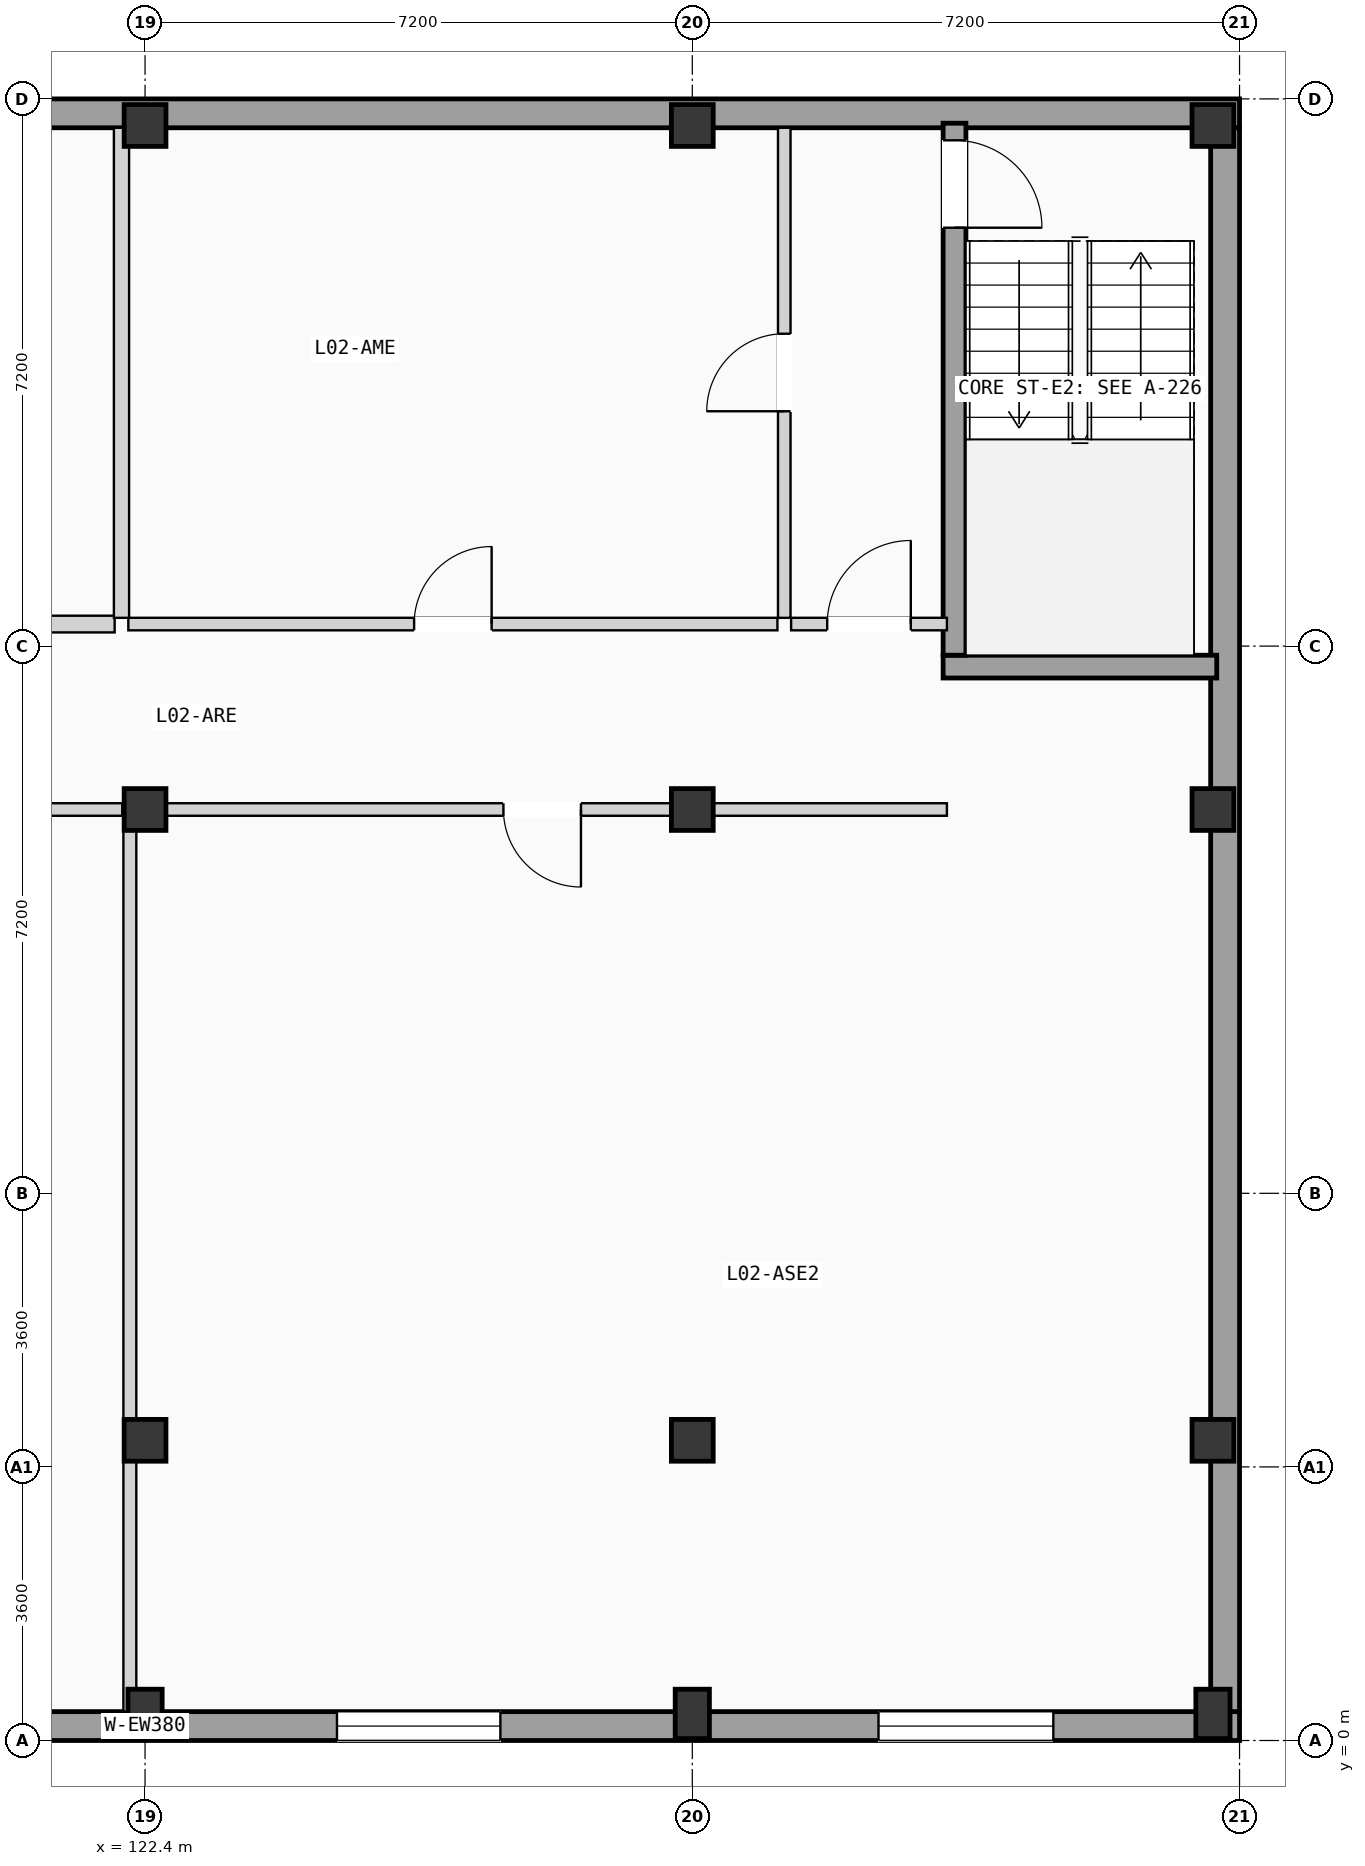
"""IFC4 building model, lengths in metres.
Left out: names, types, materials, properties, quantities, classifications, styles, units other than length and angle.
Written with IfcOpenShell. Run it as: python <this file> out.ifc"""

import sys

from ifc_helpers import new_model, si_unit, direction, frame, frame_2d, origin, origin_2d, place, context, subcontext, project, spatial, rectangle, extrude, element, fill, save


model = new_model("IFC4")
c1 = context("Model", 3, precision=1e-05, world=origin(), true_north=direction((0.0, 1.0)))
c2 = subcontext(c1, "Body", "Model", "MODEL_VIEW")
j1 = project(units=[si_unit("LENGTHUNIT", "METRE"), si_unit("PLANEANGLEUNIT", "RADIAN")], contexts=[c1])
p1 = place(None, origin())
s1 = spatial("IfcSite", under=j1, at=p1, CompositionType="ELEMENT")
p2 = place(p1, origin())
s2 = spatial("IfcBuilding", under=s1, at=p2, CompositionType="ELEMENT")
p3 = place(p2, frame((0.0, 0.0, 8.575)))
s3 = spatial("IfcBuildingStorey", under=s2, at=p3, CompositionType="ELEMENT", Elevation=8.575)
p4 = place(p3, frame((122.4, 0.35, 0.0), z_axis=(0.0, 0.0, 1.0), x_axis=(1.0, 0.0, 0.0)))
e1 = element("IfcColumn", 1, at=p4, inside=s3, PredefinedType="PILASTER", context=c2, shape_type="SweptSolid", body=[
    extrude(rectangle(XDim=0.45, YDim=0.65, at=origin_2d()), origin(), (0.0, 0.0, 1.0), 3.5),
])
for number, where, z_axis, x_axis in (
    (2, (122.4, 3.95, 0.0), (0.0, 0.0, 1.0), (1.0, 0.0, 0.0)),
    (3, (122.4, 12.25, 0.0), (0.0, 0.0, 1.0), (1.0, 0.0, 0.0)),
    (4, (122.4, 21.25, 0.0), (0.0, 0.0, 1.0), (1.0, 0.0, 0.0)),
):
    element("IfcColumn", number, at=place(p3, frame(where, z_axis=z_axis, x_axis=x_axis)), inside=s3, PredefinedType="COLUMN", context=c2, shape_type="SweptSolid", body=[
        extrude(rectangle(XDim=0.55, YDim=0.55, at=origin_2d()), origin(), (0.0, 0.0, 1.0), 3.5),
    ])
p5 = place(p3, frame((129.6, 0.35, 0.0), z_axis=(0.0, 0.0, 1.0), x_axis=(1.0, 0.0, 0.0)))
e5 = element("IfcColumn", 5, at=p5, inside=s3, PredefinedType="PILASTER", context=c2, shape_type="SweptSolid", body=[
    extrude(rectangle(XDim=0.45, YDim=0.65, at=origin_2d()), origin(), (0.0, 0.0, 1.0), 3.5),
])
for number, where, z_axis, x_axis in (
    (6, (129.6, 3.95, 0.0), (0.0, 0.0, 1.0), (1.0, 0.0, 0.0)),
    (7, (129.6, 12.25, 0.0), (0.0, 0.0, 1.0), (1.0, 0.0, 0.0)),
    (8, (129.6, 21.25, 0.0), (0.0, 0.0, 1.0), (1.0, 0.0, 0.0)),
):
    element("IfcColumn", number, at=place(p3, frame(where, z_axis=z_axis, x_axis=x_axis)), inside=s3, PredefinedType="COLUMN", context=c2, shape_type="SweptSolid", body=[
        extrude(rectangle(XDim=0.55, YDim=0.55, at=origin_2d()), origin(), (0.0, 0.0, 1.0), 3.5),
    ])
p6 = place(p3, frame((136.45, 0.35, 0.0), z_axis=(0.0, 0.0, 1.0), x_axis=(1.0, 0.0, 0.0)))
e9 = element("IfcColumn", 9, at=p6, inside=s3, PredefinedType="PILASTER", context=c2, shape_type="SweptSolid", body=[
    extrude(rectangle(XDim=0.45, YDim=0.65, at=origin_2d()), origin(), (0.0, 0.0, 1.0), 3.5),
])
for number, where, z_axis, x_axis in (
    (10, (136.45, 3.95, 0.0), (0.0, 0.0, 1.0), (1.0, 0.0, 0.0)),
    (11, (136.45, 12.25, 0.0), (0.0, 0.0, 1.0), (1.0, 0.0, 0.0)),
    (12, (136.45, 21.25, 0.0), (0.0, 0.0, 1.0), (1.0, 0.0, 0.0)),
):
    element("IfcColumn", number, at=place(p3, frame(where, z_axis=z_axis, x_axis=x_axis)), inside=s3, PredefinedType="COLUMN", context=c2, shape_type="SweptSolid", body=[
        extrude(rectangle(XDim=0.55, YDim=0.55, at=origin_2d()), origin(), (0.0, 0.0, 1.0), 3.5),
    ])
p7 = place(p3, frame((108.0, 0.19, 0.0), z_axis=(0.0, 0.0, 1.0), x_axis=(1.0, 0.0, 0.0)))
e13 = element("IfcWall", 13, at=p7, inside=s3, PredefinedType="SOLIDWALL", context=c2, shape_type="SweptSolid", body=[
    extrude(rectangle(XDim=28.8, YDim=0.38, at=frame_2d((14.4, 0.0))), origin(), (0.0, 0.0, 1.0), 3.26),
])
p8 = place(p7, frame((2.525, 0.0, 0.85)))
e14 = element("IfcOpeningElement", 14, at=p8, cuts=e13, PredefinedType="OPENING", context=c2, shape_type="SweptSolid", body=[
    extrude(rectangle(XDim=2.15, YDim=1.5, at=frame_2d((1.075, 0.75))), frame((0.0, 0.2, 0.0), z_axis=(0.0, -1.0, 0.0), x_axis=(1.0, 0.0, 0.0)), (0.0, 0.0, 1.0), 0.4),
])
p9 = place(p7, frame((9.725, 0.0, 0.85)))
e15 = element("IfcOpeningElement", 15, at=p9, cuts=e13, PredefinedType="OPENING", context=c2, shape_type="SweptSolid", body=[
    extrude(rectangle(XDim=2.15, YDim=1.35, at=frame_2d((1.075, 0.675))), frame((0.0, 0.2, 0.0), z_axis=(0.0, -1.0, 0.0), x_axis=(1.0, 0.0, 0.0)), (0.0, 0.0, 1.0), 0.4),
])
p10 = place(p7, frame((16.925, 0.0, 0.85)))
e16 = element("IfcOpeningElement", 16, at=p10, cuts=e13, PredefinedType="OPENING", context=c2, shape_type="SweptSolid", body=[
    extrude(rectangle(XDim=2.15, YDim=1.35, at=frame_2d((1.075, 0.675))), frame((0.0, 0.2, 0.0), z_axis=(0.0, -1.0, 0.0), x_axis=(1.0, 0.0, 0.0)), (0.0, 0.0, 1.0), 0.4),
])
p11 = place(p7, frame((24.05, 0.0, 0.85)))
e17 = element("IfcOpeningElement", 17, at=p11, cuts=e13, PredefinedType="OPENING", context=c2, shape_type="SweptSolid", body=[
    extrude(rectangle(XDim=2.3, YDim=1.2, at=frame_2d((1.15, 0.6))), frame((0.0, 0.2, 0.0), z_axis=(0.0, -1.0, 0.0), x_axis=(1.0, 0.0, 0.0)), (0.0, 0.0, 1.0), 0.4),
])
p12 = place(p3, frame((108.0, 21.41, 0.0), z_axis=(0.0, 0.0, 1.0), x_axis=(1.0, 0.0, 0.0)))
e18 = element("IfcWall", 18, at=p12, inside=s3, PredefinedType="SOLIDWALL", context=c2, shape_type="SweptSolid", body=[
    extrude(rectangle(XDim=28.8, YDim=0.38, at=frame_2d((14.4, 0.0))), origin(), (0.0, 0.0, 1.0), 3.26),
])
p13 = place(p3, frame((136.61, 0.38, 0.0), z_axis=(0.0, 0.0, 1.0), x_axis=(0.0, 1.0, 0.0)))
e19 = element("IfcWall", 19, at=p13, inside=s3, PredefinedType="SOLIDWALL", context=c2, shape_type="SweptSolid", body=[
    extrude(rectangle(XDim=20.84, YDim=0.38, at=frame_2d((10.42, 0.0))), origin(), (0.0, 0.0, 1.0), 3.26),
])
p14 = place(p3, frame((132.9, 14.13, 0.0), z_axis=(0.0, 0.0, 1.0), x_axis=(1.0, 0.0, 0.0)))
e20 = element("IfcWall", 20, at=p14, inside=s3, PredefinedType="SHEAR", context=c2, shape_type="SweptSolid", body=[
    extrude(rectangle(XDim=3.6, YDim=0.3, at=frame_2d((1.8, 0.0))), origin(), (0.0, 0.0, 1.0), 3.26),
])
p15 = place(p3, frame((133.05, 14.28, 0.0), z_axis=(0.0, 0.0, 1.0), x_axis=(0.0, 1.0, 0.0)))
e21 = element("IfcWall", 21, at=p15, inside=s3, PredefinedType="SHEAR", context=c2, shape_type="SweptSolid", body=[
    extrude(rectangle(XDim=7.0, YDim=0.3, at=frame_2d((3.5, 0.0))), origin(), (0.0, 0.0, 1.0), 3.26),
])
p16 = place(p15, frame((5.625, 0.0, 0.0)))
e22 = element("IfcOpeningElement", 22, at=p16, cuts=e21, PredefinedType="OPENING", context=c2, shape_type="SweptSolid", body=[
    extrude(rectangle(XDim=1.15, YDim=2.12, at=frame_2d((0.575, 1.06))), frame((0.0, 0.16, 0.0), z_axis=(0.0, -1.0, 0.0), x_axis=(1.0, 0.0, 0.0)), (0.0, 0.0, 1.0), 0.32),
])
p17 = place(p3, frame((130.9, 14.69, 0.0), z_axis=(0.0, 0.0, 1.0), x_axis=(1.0, 0.0, 0.0)))
e23 = element("IfcWall", 23, at=p17, inside=s3, PredefinedType="PARTITIONING", context=c2, shape_type="SweptSolid", body=[
    extrude(rectangle(XDim=2.05, YDim=0.165, at=frame_2d((1.025, 0.0))), origin(), (0.0, 0.0, 1.0), 3.22),
])
p18 = place(p17, frame((0.475, 0.0, 0.0)))
e24 = element("IfcOpeningElement", 24, at=p18, cuts=e23, PredefinedType="OPENING", context=c2, shape_type="SweptSolid", body=[
    extrude(rectangle(XDim=1.1, YDim=2.12, at=frame_2d((0.55, 1.06))), frame((0.0, 0.093, 0.0), z_axis=(0.0, -1.0, 0.0), x_axis=(1.0, 0.0, 0.0)), (0.0, 0.0, 1.0), 0.185),
])
p19 = place(p3, frame((111.85, 12.25, 0.0), z_axis=(0.0, 0.0, 1.0), x_axis=(1.0, 0.0, 0.0)))
e25 = element("IfcWall", 25, at=p19, inside=s3, PredefinedType="PARTITIONING", context=c2, shape_type="SweptSolid", body=[
    extrude(rectangle(XDim=10.25, YDim=0.165, at=frame_2d((5.125, 0.0))), origin(), (0.0, 0.0, 1.0), 2.58),
])
p20 = place(p19, frame((4.615, 0.0, 0.0)))
e26 = element("IfcOpeningElement", 26, at=p20, cuts=e25, PredefinedType="OPENING", context=c2, shape_type="SweptSolid", body=[
    extrude(rectangle(XDim=1.02, YDim=2.16, at=frame_2d((0.51, 1.08))), frame((0.0, 0.093, 0.0), z_axis=(0.0, -1.0, 0.0), x_axis=(1.0, 0.0, 0.0)), (0.0, 0.0, 1.0), 0.185),
])
p21 = place(p3, frame((122.3, 12.25, 0.0), z_axis=(0.0, 0.0, 1.0), x_axis=(1.0, 0.0, 0.0)))
e27 = element("IfcWall", 27, at=p21, inside=s3, PredefinedType="PARTITIONING", context=c2, shape_type="SweptSolid", body=[
    extrude(rectangle(XDim=10.65, YDim=0.165, at=frame_2d((5.325, 0.0))), origin(), (0.0, 0.0, 1.0), 2.58),
])
p22 = place(p21, frame((4.815, 0.0, 0.0)))
e28 = element("IfcOpeningElement", 28, at=p22, cuts=e27, PredefinedType="OPENING", context=c2, shape_type="SweptSolid", body=[
    extrude(rectangle(XDim=1.02, YDim=2.16, at=frame_2d((0.51, 1.08))), frame((0.0, 0.093, 0.0), z_axis=(0.0, -1.0, 0.0), x_axis=(1.0, 0.0, 0.0)), (0.0, 0.0, 1.0), 0.185),
])
p23 = place(p3, frame((118.2, 14.69, 0.0), z_axis=(0.0, 0.0, 1.0), x_axis=(1.0, 0.0, 0.0)))
e29 = element("IfcWall", 29, at=p23, inside=s3, PredefinedType="PLUMBINGWALL", context=c2, shape_type="SweptSolid", body=[
    extrude(rectangle(XDim=3.8, YDim=0.22, at=frame_2d((1.9, 0.0))), origin(), (0.0, 0.0, 1.0), 3.22),
])
p24 = place(p23, frame((1.42, 0.0, 0.0)))
e30 = element("IfcOpeningElement", 30, at=p24, cuts=e29, PredefinedType="OPENING", context=c2, shape_type="SweptSolid", body=[
    extrude(rectangle(XDim=0.96, YDim=2.05, at=frame_2d((0.48, 1.025))), frame((0.0, 0.12, 0.0), z_axis=(0.0, -1.0, 0.0), x_axis=(1.0, 0.0, 0.0)), (0.0, 0.0, 1.0), 0.24),
])
p25 = place(p3, frame((122.18, 14.69, 0.0), z_axis=(0.0, 0.0, 1.0), x_axis=(1.0, 0.0, 0.0)))
e31 = element("IfcWall", 31, at=p25, inside=s3, PredefinedType="PARTITIONING", context=c2, shape_type="SweptSolid", body=[
    extrude(rectangle(XDim=8.54, YDim=0.165, at=frame_2d((4.27, 0.0))), origin(), (0.0, 0.0, 1.0), 3.22),
])
p26 = place(p25, frame((3.76, 0.0, 0.0)))
e32 = element("IfcOpeningElement", 32, at=p26, cuts=e31, PredefinedType="OPENING", context=c2, shape_type="SweptSolid", body=[
    extrude(rectangle(XDim=1.02, YDim=2.16, at=frame_2d((0.51, 1.08))), frame((0.0, 0.093, 0.0), z_axis=(0.0, -1.0, 0.0), x_axis=(1.0, 0.0, 0.0)), (0.0, 0.0, 1.0), 0.185),
])
p27 = place(p3, frame((130.81, 14.772, 0.0), z_axis=(0.0, 0.0, 1.0), x_axis=(0.0, 1.0, 0.0)))
e33 = element("IfcWall", 33, at=p27, inside=s3, PredefinedType="PARTITIONING", context=c2, shape_type="SweptSolid", body=[
    extrude(rectangle(XDim=6.448, YDim=0.165, at=frame_2d((3.224, 0.0))), origin(), (0.0, 0.0, 1.0), 3.22),
])
p28 = place(p27, frame((2.718, 0.0, 0.0)))
e34 = element("IfcOpeningElement", 34, at=p28, cuts=e33, PredefinedType="OPENING", context=c2, shape_type="SweptSolid", body=[
    extrude(rectangle(XDim=1.02, YDim=2.16, at=frame_2d((0.51, 1.08))), frame((0.0, 0.093, 0.0), z_axis=(0.0, -1.0, 0.0), x_axis=(1.0, 0.0, 0.0)), (0.0, 0.0, 1.0), 0.185),
])
p29 = place(p3, frame((122.2, 0.38, 0.0), z_axis=(0.0, 0.0, 1.0), x_axis=(0.0, 1.0, 0.0)))
e35 = element("IfcWall", 35, at=p29, inside=s3, PredefinedType="PARTITIONING", context=c2, shape_type="SweptSolid", body=[
    extrude(rectangle(XDim=11.788, YDim=0.17, at=frame_2d((5.894, 0.0))), origin(), (0.0, 0.0, 1.0), 2.63),
])
p30 = place(p3, frame((122.09, 14.772, 0.0), z_axis=(0.0, 0.0, 1.0), x_axis=(0.0, 1.0, 0.0)))
e36 = element("IfcWall", 36, at=p30, inside=s3, PredefinedType="PLUMBINGWALL", context=c2, shape_type="SweptSolid", body=[
    extrude(rectangle(XDim=6.448, YDim=0.2, at=frame_2d((3.224, 0.0))), origin(), (0.0, 0.0, 1.0), 2.63),
])
p31 = place(p10, origin())
e37 = element("IfcWindow", 37, at=p31, inside=s3, PartitioningType="DOUBLE_PANEL_VERTICAL", PredefinedType="WINDOW", context=c2, shape_type="SweptSolid", body=[
    extrude(rectangle(XDim=2.15, YDim=1.35, at=frame_2d((1.075, 0.675))), frame((0.0, 0.03, 0.0), z_axis=(0.0, -1.0, 0.0), x_axis=(1.0, 0.0, 0.0)), (0.0, 0.0, 1.0), 0.06),
])
fill(e16, e37)
p32 = place(p11, origin())
e38 = element("IfcWindow", 38, at=p32, inside=s3, PartitioningType="DOUBLE_PANEL_VERTICAL", PredefinedType="WINDOW", context=c2, shape_type="SweptSolid", body=[
    extrude(rectangle(XDim=2.3, YDim=1.2, at=frame_2d((1.15, 0.6))), frame((0.0, 0.03, 0.0), z_axis=(0.0, -1.0, 0.0), x_axis=(1.0, 0.0, 0.0)), (0.0, 0.0, 1.0), 0.06),
])
fill(e17, e38)
p33 = place(p16, frame((1.15, 0.0, 0.0), z_axis=(0.0, 0.0, 1.0), x_axis=(-1.0, 0.0, 0.0)))
e39 = element("IfcDoor", 39, at=p33, inside=s3, OperationType="SINGLE_SWING_LEFT", PredefinedType="DOOR", context=c2, shape_type="SweptSolid", body=[
    extrude(rectangle(XDim=1.15, YDim=2.12, at=frame_2d((0.575, 1.06))), frame((0.0, 0.025, 0.0), z_axis=(0.0, -1.0, 0.0), x_axis=(1.0, 0.0, 0.0)), (0.0, 0.0, 1.0), 0.05),
])
fill(e22, e39)
p34 = place(p18, origin())
e40 = element("IfcDoor", 40, at=p34, inside=s3, OperationType="SINGLE_SWING_RIGHT", PredefinedType="DOOR", context=c2, shape_type="SweptSolid", body=[
    extrude(rectangle(XDim=1.1, YDim=2.12, at=frame_2d((0.55, 1.06))), frame((0.0, 0.025, 0.0), z_axis=(0.0, -1.0, 0.0), x_axis=(1.0, 0.0, 0.0)), (0.0, 0.0, 1.0), 0.05),
])
fill(e24, e40)
p35 = place(p22, frame((1.02, 0.0, 0.0), z_axis=(0.0, 0.0, 1.0), x_axis=(-1.0, 0.0, 0.0)))
e41 = element("IfcDoor", 41, at=p35, inside=s3, OperationType="SINGLE_SWING_RIGHT", PredefinedType="DOOR", context=c2, shape_type="SweptSolid", body=[
    extrude(rectangle(XDim=1.02, YDim=2.16, at=frame_2d((0.51, 1.08))), frame((0.0, 0.025, 0.0), z_axis=(0.0, -1.0, 0.0), x_axis=(1.0, 0.0, 0.0)), (0.0, 0.0, 1.0), 0.05),
])
fill(e28, e41)
p36 = place(p26, origin())
e42 = element("IfcDoor", 42, at=p36, inside=s3, OperationType="SINGLE_SWING_RIGHT", PredefinedType="DOOR", context=c2, shape_type="SweptSolid", body=[
    extrude(rectangle(XDim=1.02, YDim=2.16, at=frame_2d((0.51, 1.08))), frame((0.0, 0.025, 0.0), z_axis=(0.0, -1.0, 0.0), x_axis=(1.0, 0.0, 0.0)), (0.0, 0.0, 1.0), 0.05),
])
fill(e32, e42)
p37 = place(p28, origin())
e43 = element("IfcDoor", 43, at=p37, inside=s3, OperationType="SINGLE_SWING_LEFT", PredefinedType="DOOR", context=c2, shape_type="SweptSolid", body=[
    extrude(rectangle(XDim=1.02, YDim=2.16, at=frame_2d((0.51, 1.08))), frame((0.0, 0.025, 0.0), z_axis=(0.0, -1.0, 0.0), x_axis=(1.0, 0.0, 0.0)), (0.0, 0.0, 1.0), 0.05),
])
fill(e34, e43)
save(model, sys.argv[1])
